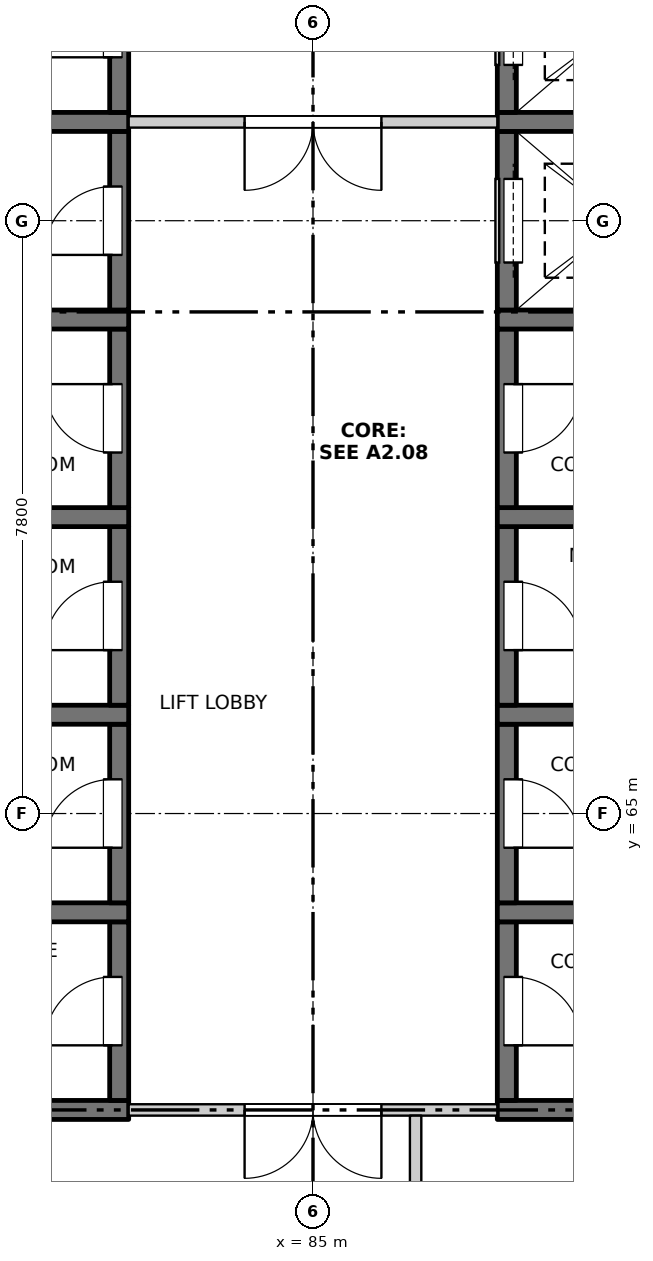
"""IFC4 building model, lengths in metres.
Left out: names, types, materials, properties, quantities, classifications, styles, units other than length and angle.
Written with IfcOpenShell. Run it as: python <this file> out.ifc"""

import sys

from ifc_helpers import new_model, si_unit, direction, frame, frame_2d, origin, place, context, subcontext, project, spatial, rectangle, extrude, element, fill, save


model = new_model("IFC4")
c1 = context("Model", 3, precision=1e-05, world=origin(), true_north=direction((0.0, 1.0)))
c2 = subcontext(c1, "Body", "Model", "MODEL_VIEW")
j1 = project(units=[si_unit("LENGTHUNIT", "METRE"), si_unit("PLANEANGLEUNIT", "RADIAN")], contexts=[c1])
p1 = place(None, origin())
s1 = spatial("IfcSite", under=j1, at=p1, CompositionType="ELEMENT")
p2 = place(p1, origin())
s2 = spatial("IfcBuilding", under=s1, at=p2, CompositionType="ELEMENT")
p3 = place(p2, frame((0.0, 0.0, 246.0)))
s3 = spatial("IfcBuildingStorey", under=s2, at=p3, CompositionType="ELEMENT", Elevation=246.0)
p4 = place(p3, frame((79.575, 61.1, -0.3), z_axis=(0.0, 0.0, 1.0), x_axis=(1.0, 0.0, 0.0)))
e1 = element("IfcWall", 1, at=p4, inside=s3, PredefinedType="SOLIDWALL", context=c2, shape_type="SweptSolid", body=[
    extrude(rectangle(XDim=3.0, YDim=0.25, at=frame_2d((1.5, 0.0))), origin(), (0.0, 0.0, 1.0), 3.45),
])
p5 = place(p3, frame((82.45, 61.225, -0.3), z_axis=(0.0, 0.0, 1.0), x_axis=(0.0, 1.0, 0.0)))
e2 = element("IfcWall", 2, at=p5, inside=s3, PredefinedType="SOLIDWALL", context=c2, shape_type="SweptSolid", body=[
    extrude(rectangle(XDim=2.35, YDim=0.25, at=frame_2d((1.175, 0.0))), origin(), (0.0, 0.0, 1.0), 3.45),
])
p6 = place(p5, frame((0.725, 0.0, 0.3)))
e3 = element("IfcOpeningElement", 3, at=p6, cuts=e2, PredefinedType="OPENING", context=c2, shape_type="SweptSolid", body=[
    extrude(rectangle(XDim=0.9, YDim=2.1, at=frame_2d((0.45, 1.05))), frame((0.0, 0.135, 0.0), z_axis=(0.0, -1.0, 0.0), x_axis=(1.0, 0.0, 0.0)), (0.0, 0.0, 1.0), 0.27),
])
p7 = place(p3, frame((79.575, 63.7, -0.3), z_axis=(0.0, 0.0, 1.0), x_axis=(1.0, 0.0, 0.0)))
e4 = element("IfcWall", 4, at=p7, inside=s3, PredefinedType="SOLIDWALL", context=c2, shape_type="SweptSolid", body=[
    extrude(rectangle(XDim=3.0, YDim=0.25, at=frame_2d((1.5, 0.0))), origin(), (0.0, 0.0, 1.0), 3.45),
])
p8 = place(p3, frame((82.45, 63.825, -0.3), z_axis=(0.0, 0.0, 1.0), x_axis=(0.0, 1.0, 0.0)))
e5 = element("IfcWall", 5, at=p8, inside=s3, PredefinedType="SOLIDWALL", context=c2, shape_type="SweptSolid", body=[
    extrude(rectangle(XDim=2.35, YDim=0.25, at=frame_2d((1.175, 0.0))), origin(), (0.0, 0.0, 1.0), 3.45),
])
p9 = place(p8, frame((0.725, 0.0, 0.3)))
e6 = element("IfcOpeningElement", 6, at=p9, cuts=e5, PredefinedType="OPENING", context=c2, shape_type="SweptSolid", body=[
    extrude(rectangle(XDim=0.9, YDim=2.1, at=frame_2d((0.45, 1.05))), frame((0.0, 0.135, 0.0), z_axis=(0.0, -1.0, 0.0), x_axis=(1.0, 0.0, 0.0)), (0.0, 0.0, 1.0), 0.27),
])
p10 = place(p3, frame((79.575, 66.3, -0.3), z_axis=(0.0, 0.0, 1.0), x_axis=(1.0, 0.0, 0.0)))
e7 = element("IfcWall", 7, at=p10, inside=s3, PredefinedType="SOLIDWALL", context=c2, shape_type="SweptSolid", body=[
    extrude(rectangle(XDim=3.0, YDim=0.25, at=frame_2d((1.5, 0.0))), origin(), (0.0, 0.0, 1.0), 3.45),
])
p11 = place(p3, frame((82.45, 66.425, -0.3), z_axis=(0.0, 0.0, 1.0), x_axis=(0.0, 1.0, 0.0)))
e8 = element("IfcWall", 8, at=p11, inside=s3, PredefinedType="SOLIDWALL", context=c2, shape_type="SweptSolid", body=[
    extrude(rectangle(XDim=2.35, YDim=0.25, at=frame_2d((1.175, 0.0))), origin(), (0.0, 0.0, 1.0), 3.45),
])
p12 = place(p11, frame((0.725, 0.0, 0.3)))
e9 = element("IfcOpeningElement", 9, at=p12, cuts=e8, PredefinedType="OPENING", context=c2, shape_type="SweptSolid", body=[
    extrude(rectangle(XDim=0.9, YDim=2.1, at=frame_2d((0.45, 1.05))), frame((0.0, 0.135, 0.0), z_axis=(0.0, -1.0, 0.0), x_axis=(1.0, 0.0, 0.0)), (0.0, 0.0, 1.0), 0.27),
])
p13 = place(p3, frame((79.575, 68.9, -0.3), z_axis=(0.0, 0.0, 1.0), x_axis=(1.0, 0.0, 0.0)))
e10 = element("IfcWall", 10, at=p13, inside=s3, PredefinedType="SOLIDWALL", context=c2, shape_type="SweptSolid", body=[
    extrude(rectangle(XDim=3.0, YDim=0.25, at=frame_2d((1.5, 0.0))), origin(), (0.0, 0.0, 1.0), 3.45),
])
p14 = place(p3, frame((82.45, 69.025, -0.3), z_axis=(0.0, 0.0, 1.0), x_axis=(0.0, 1.0, 0.0)))
e11 = element("IfcWall", 11, at=p14, inside=s3, PredefinedType="SOLIDWALL", context=c2, shape_type="SweptSolid", body=[
    extrude(rectangle(XDim=2.35, YDim=0.25, at=frame_2d((1.175, 0.0))), origin(), (0.0, 0.0, 1.0), 3.45),
])
p15 = place(p14, frame((0.725, 0.0, 0.3)))
e12 = element("IfcOpeningElement", 12, at=p15, cuts=e11, PredefinedType="OPENING", context=c2, shape_type="SweptSolid", body=[
    extrude(rectangle(XDim=0.9, YDim=2.1, at=frame_2d((0.45, 1.05))), frame((0.0, 0.135, 0.0), z_axis=(0.0, -1.0, 0.0), x_axis=(1.0, 0.0, 0.0)), (0.0, 0.0, 1.0), 0.27),
])
p16 = place(p3, frame((79.575, 71.5, -0.3), z_axis=(0.0, 0.0, 1.0), x_axis=(1.0, 0.0, 0.0)))
e13 = element("IfcWall", 13, at=p16, inside=s3, PredefinedType="SOLIDWALL", context=c2, shape_type="SweptSolid", body=[
    extrude(rectangle(XDim=3.0, YDim=0.25, at=frame_2d((1.5, 0.0))), origin(), (0.0, 0.0, 1.0), 3.45),
])
p17 = place(p3, frame((82.45, 71.625, -0.3), z_axis=(0.0, 0.0, 1.0), x_axis=(0.0, 1.0, 0.0)))
e14 = element("IfcWall", 14, at=p17, inside=s3, PredefinedType="SOLIDWALL", context=c2, shape_type="SweptSolid", body=[
    extrude(rectangle(XDim=2.35, YDim=0.25, at=frame_2d((1.175, 0.0))), origin(), (0.0, 0.0, 1.0), 3.45),
])
p18 = place(p17, frame((0.725, 0.0, 0.3)))
e15 = element("IfcOpeningElement", 15, at=p18, cuts=e14, PredefinedType="OPENING", context=c2, shape_type="SweptSolid", body=[
    extrude(rectangle(XDim=0.9, YDim=2.1, at=frame_2d((0.45, 1.05))), frame((0.0, 0.135, 0.0), z_axis=(0.0, -1.0, 0.0), x_axis=(1.0, 0.0, 0.0)), (0.0, 0.0, 1.0), 0.27),
])
p19 = place(p3, frame((79.575, 74.1, -0.3), z_axis=(0.0, 0.0, 1.0), x_axis=(1.0, 0.0, 0.0)))
e16 = element("IfcWall", 16, at=p19, inside=s3, PredefinedType="SOLIDWALL", context=c2, shape_type="SweptSolid", body=[
    extrude(rectangle(XDim=3.0, YDim=0.25, at=frame_2d((1.5, 0.0))), origin(), (0.0, 0.0, 1.0), 3.45),
])
p20 = place(p3, frame((82.45, 74.225, -0.3), z_axis=(0.0, 0.0, 1.0), x_axis=(0.0, 1.0, 0.0)))
e17 = element("IfcWall", 17, at=p20, inside=s3, PredefinedType="SOLIDWALL", context=c2, shape_type="SweptSolid", body=[
    extrude(rectangle(XDim=2.35, YDim=0.25, at=frame_2d((1.175, 0.0))), origin(), (0.0, 0.0, 1.0), 3.45),
])
p21 = place(p20, frame((0.725, 0.0, 0.3)))
e18 = element("IfcOpeningElement", 18, at=p21, cuts=e17, PredefinedType="OPENING", context=c2, shape_type="SweptSolid", body=[
    extrude(rectangle(XDim=0.9, YDim=2.1, at=frame_2d((0.45, 1.05))), frame((0.0, 0.135, 0.0), z_axis=(0.0, -1.0, 0.0), x_axis=(1.0, 0.0, 0.0)), (0.0, 0.0, 1.0), 0.27),
])
p22 = place(p3, frame((87.425, 61.1, -0.3), z_axis=(0.0, 0.0, 1.0), x_axis=(1.0, 0.0, 0.0)))
e19 = element("IfcWall", 19, at=p22, inside=s3, PredefinedType="SOLIDWALL", context=c2, shape_type="SweptSolid", body=[
    extrude(rectangle(XDim=3.0, YDim=0.25, at=frame_2d((1.5, 0.0))), origin(), (0.0, 0.0, 1.0), 3.45),
])
p23 = place(p3, frame((87.55, 61.225, -0.3), z_axis=(0.0, 0.0, 1.0), x_axis=(0.0, 1.0, 0.0)))
e20 = element("IfcWall", 20, at=p23, inside=s3, PredefinedType="SOLIDWALL", context=c2, shape_type="SweptSolid", body=[
    extrude(rectangle(XDim=2.35, YDim=0.25, at=frame_2d((1.175, 0.0))), origin(), (0.0, 0.0, 1.0), 3.45),
])
p24 = place(p23, frame((0.725, 0.0, 0.3)))
e21 = element("IfcOpeningElement", 21, at=p24, cuts=e20, PredefinedType="OPENING", context=c2, shape_type="SweptSolid", body=[
    extrude(rectangle(XDim=0.9, YDim=2.1, at=frame_2d((0.45, 1.05))), frame((0.0, 0.135, 0.0), z_axis=(0.0, -1.0, 0.0), x_axis=(1.0, 0.0, 0.0)), (0.0, 0.0, 1.0), 0.27),
])
p25 = place(p3, frame((87.425, 63.7, -0.3), z_axis=(0.0, 0.0, 1.0), x_axis=(1.0, 0.0, 0.0)))
e22 = element("IfcWall", 22, at=p25, inside=s3, PredefinedType="SOLIDWALL", context=c2, shape_type="SweptSolid", body=[
    extrude(rectangle(XDim=3.0, YDim=0.25, at=frame_2d((1.5, 0.0))), origin(), (0.0, 0.0, 1.0), 3.45),
])
p26 = place(p3, frame((87.55, 63.825, -0.3), z_axis=(0.0, 0.0, 1.0), x_axis=(0.0, 1.0, 0.0)))
e23 = element("IfcWall", 23, at=p26, inside=s3, PredefinedType="SOLIDWALL", context=c2, shape_type="SweptSolid", body=[
    extrude(rectangle(XDim=2.35, YDim=0.25, at=frame_2d((1.175, 0.0))), origin(), (0.0, 0.0, 1.0), 3.45),
])
p27 = place(p26, frame((0.725, 0.0, 0.3)))
e24 = element("IfcOpeningElement", 24, at=p27, cuts=e23, PredefinedType="OPENING", context=c2, shape_type="SweptSolid", body=[
    extrude(rectangle(XDim=0.9, YDim=2.1, at=frame_2d((0.45, 1.05))), frame((0.0, 0.135, 0.0), z_axis=(0.0, -1.0, 0.0), x_axis=(1.0, 0.0, 0.0)), (0.0, 0.0, 1.0), 0.27),
])
p28 = place(p3, frame((87.425, 66.3, -0.3), z_axis=(0.0, 0.0, 1.0), x_axis=(1.0, 0.0, 0.0)))
e25 = element("IfcWall", 25, at=p28, inside=s3, PredefinedType="SOLIDWALL", context=c2, shape_type="SweptSolid", body=[
    extrude(rectangle(XDim=3.0, YDim=0.25, at=frame_2d((1.5, 0.0))), origin(), (0.0, 0.0, 1.0), 3.45),
])
p29 = place(p3, frame((87.55, 66.425, -0.3), z_axis=(0.0, 0.0, 1.0), x_axis=(0.0, 1.0, 0.0)))
e26 = element("IfcWall", 26, at=p29, inside=s3, PredefinedType="SOLIDWALL", context=c2, shape_type="SweptSolid", body=[
    extrude(rectangle(XDim=2.35, YDim=0.25, at=frame_2d((1.175, 0.0))), origin(), (0.0, 0.0, 1.0), 3.45),
])
p30 = place(p29, frame((0.725, 0.0, 0.3)))
e27 = element("IfcOpeningElement", 27, at=p30, cuts=e26, PredefinedType="OPENING", context=c2, shape_type="SweptSolid", body=[
    extrude(rectangle(XDim=0.9, YDim=2.1, at=frame_2d((0.45, 1.05))), frame((0.0, 0.135, 0.0), z_axis=(0.0, -1.0, 0.0), x_axis=(1.0, 0.0, 0.0)), (0.0, 0.0, 1.0), 0.27),
])
p31 = place(p3, frame((87.425, 68.9, -0.3), z_axis=(0.0, 0.0, 1.0), x_axis=(1.0, 0.0, 0.0)))
e28 = element("IfcWall", 28, at=p31, inside=s3, PredefinedType="SOLIDWALL", context=c2, shape_type="SweptSolid", body=[
    extrude(rectangle(XDim=3.0, YDim=0.25, at=frame_2d((1.5, 0.0))), origin(), (0.0, 0.0, 1.0), 3.45),
])
p32 = place(p3, frame((87.55, 69.025, -0.3), z_axis=(0.0, 0.0, 1.0), x_axis=(0.0, 1.0, 0.0)))
e29 = element("IfcWall", 29, at=p32, inside=s3, PredefinedType="SOLIDWALL", context=c2, shape_type="SweptSolid", body=[
    extrude(rectangle(XDim=2.35, YDim=0.25, at=frame_2d((1.175, 0.0))), origin(), (0.0, 0.0, 1.0), 3.45),
])
p33 = place(p32, frame((0.725, 0.0, 0.3)))
e30 = element("IfcOpeningElement", 30, at=p33, cuts=e29, PredefinedType="OPENING", context=c2, shape_type="SweptSolid", body=[
    extrude(rectangle(XDim=0.9, YDim=2.1, at=frame_2d((0.45, 1.05))), frame((0.0, 0.135, 0.0), z_axis=(0.0, -1.0, 0.0), x_axis=(1.0, 0.0, 0.0)), (0.0, 0.0, 1.0), 0.27),
])
p34 = place(p3, frame((87.425, 71.5, -0.3), z_axis=(0.0, 0.0, 1.0), x_axis=(1.0, 0.0, 0.0)))
e31 = element("IfcWall", 31, at=p34, inside=s3, PredefinedType="SOLIDWALL", context=c2, shape_type="SweptSolid", body=[
    extrude(rectangle(XDim=3.0, YDim=0.25, at=frame_2d((1.5, 0.0))), origin(), (0.0, 0.0, 1.0), 3.45),
])
p35 = place(p3, frame((87.55, 71.625, -0.3), z_axis=(0.0, 0.0, 1.0), x_axis=(0.0, 1.0, 0.0)))
e32 = element("IfcWall", 32, at=p35, inside=s3, PredefinedType="SOLIDWALL", context=c2, shape_type="SweptSolid", body=[
    extrude(rectangle(XDim=2.35, YDim=0.25, at=frame_2d((1.175, 0.0))), origin(), (0.0, 0.0, 1.0), 3.45),
])
p36 = place(p35, frame((0.625, 0.0, 0.3)))
e33 = element("IfcOpeningElement", 33, at=p36, cuts=e32, PredefinedType="OPENING", context=c2, shape_type="SweptSolid", body=[
    extrude(rectangle(XDim=1.1, YDim=2.1, at=frame_2d((0.55, 1.05))), frame((0.0, 0.135, 0.0), z_axis=(0.0, -1.0, 0.0), x_axis=(1.0, 0.0, 0.0)), (0.0, 0.0, 1.0), 0.27),
])
p37 = place(p3, frame((87.425, 74.1, -0.3), z_axis=(0.0, 0.0, 1.0), x_axis=(1.0, 0.0, 0.0)))
e34 = element("IfcWall", 34, at=p37, inside=s3, PredefinedType="SOLIDWALL", context=c2, shape_type="SweptSolid", body=[
    extrude(rectangle(XDim=3.0, YDim=0.25, at=frame_2d((1.5, 0.0))), origin(), (0.0, 0.0, 1.0), 3.45),
])
p38 = place(p3, frame((87.55, 74.225, -0.3), z_axis=(0.0, 0.0, 1.0), x_axis=(0.0, 1.0, 0.0)))
e35 = element("IfcWall", 35, at=p38, inside=s3, PredefinedType="SOLIDWALL", context=c2, shape_type="SweptSolid", body=[
    extrude(rectangle(XDim=2.35, YDim=0.25, at=frame_2d((1.175, 0.0))), origin(), (0.0, 0.0, 1.0), 3.45),
])
p39 = place(p38, frame((0.625, 0.0, 0.3)))
e36 = element("IfcOpeningElement", 36, at=p39, cuts=e35, PredefinedType="OPENING", context=c2, shape_type="SweptSolid", body=[
    extrude(rectangle(XDim=1.1, YDim=2.1, at=frame_2d((0.55, 1.05))), frame((0.0, 0.135, 0.0), z_axis=(0.0, -1.0, 0.0), x_axis=(1.0, 0.0, 0.0)), (0.0, 0.0, 1.0), 0.27),
])
p40 = place(p3, frame((82.575, 61.1, 0.0), z_axis=(0.0, 0.0, 1.0), x_axis=(1.0, 0.0, 0.0)))
e37 = element("IfcWall", 37, at=p40, inside=s3, PredefinedType="PARTITIONING", context=c2, shape_type="SweptSolid", body=[
    extrude(rectangle(XDim=4.85, YDim=0.15, at=frame_2d((2.425, 0.0))), origin(), (0.0, 0.0, 1.0), 3.15),
])
p41 = place(p40, frame((1.525, 0.0, 0.0)))
e38 = element("IfcOpeningElement", 38, at=p41, cuts=e37, PredefinedType="OPENING", context=c2, shape_type="SweptSolid", body=[
    extrude(rectangle(XDim=1.8, YDim=2.1, at=frame_2d((0.9, 1.05))), frame((0.0, 0.085, 0.0), z_axis=(0.0, -1.0, 0.0), x_axis=(1.0, 0.0, 0.0)), (0.0, 0.0, 1.0), 0.17),
])
p42 = place(p3, frame((82.575, 74.1, 0.0), z_axis=(0.0, 0.0, 1.0), x_axis=(1.0, 0.0, 0.0)))
e39 = element("IfcWall", 39, at=p42, inside=s3, PredefinedType="PARTITIONING", context=c2, shape_type="SweptSolid", body=[
    extrude(rectangle(XDim=4.85, YDim=0.15, at=frame_2d((2.425, 0.0))), origin(), (0.0, 0.0, 1.0), 3.15),
])
p43 = place(p42, frame((1.525, 0.0, 0.0)))
e40 = element("IfcOpeningElement", 40, at=p43, cuts=e39, PredefinedType="OPENING", context=c2, shape_type="SweptSolid", body=[
    extrude(rectangle(XDim=1.8, YDim=2.1, at=frame_2d((0.9, 1.05))), frame((0.0, 0.085, 0.0), z_axis=(0.0, -1.0, 0.0), x_axis=(1.0, 0.0, 0.0)), (0.0, 0.0, 1.0), 0.17),
])
p44 = place(p3, frame((86.35, 55.45, 0.0), z_axis=(0.0, 0.0, 1.0), x_axis=(0.0, 1.0, 0.0)))
e41 = element("IfcWall", 41, at=p44, inside=s3, PredefinedType="PARTITIONING", context=c2, shape_type="SweptSolid", body=[
    extrude(rectangle(XDim=5.575, YDim=0.15, at=frame_2d((2.788, 0.0))), origin(), (0.0, 0.0, 1.0), 3.15),
])
p45 = place(p44, frame((2.25, 0.0, 0.0)))
e42 = element("IfcOpeningElement", 42, at=p45, cuts=e41, PredefinedType="OPENING", context=c2, shape_type="SweptSolid", body=[
    extrude(rectangle(XDim=0.9, YDim=2.1, at=frame_2d((0.45, 1.05))), frame((0.0, 0.085, 0.0), z_axis=(0.0, -1.0, 0.0), x_axis=(1.0, 0.0, 0.0)), (0.0, 0.0, 1.0), 0.17),
])
p46 = place(p41, origin())
e43 = element("IfcDoor", 43, at=p46, inside=s3, OperationType="DOUBLE_DOOR_SINGLE_SWING", PredefinedType="DOOR", context=c2, shape_type="SweptSolid", body=[
    extrude(rectangle(XDim=1.8, YDim=2.1, at=frame_2d((0.9, 1.05))), frame((0.0, 0.025, 0.0), z_axis=(0.0, -1.0, 0.0), x_axis=(1.0, 0.0, 0.0)), (0.0, 0.0, 1.0), 0.05),
])
fill(e38, e43)
p47 = place(p6, origin())
e44 = element("IfcDoor", 44, at=p47, inside=s3, OperationType="SINGLE_SWING_LEFT", PredefinedType="DOOR", context=c2, shape_type="SweptSolid", body=[
    extrude(rectangle(XDim=0.9, YDim=2.1, at=frame_2d((0.45, 1.05))), frame((0.0, 0.11, 0.0), z_axis=(0.0, -1.0, 0.0), x_axis=(1.0, 0.0, 0.0)), (0.0, 0.0, 1.0), 0.05),
])
fill(e3, e44)
p48 = place(p24, origin())
e45 = element("IfcDoor", 45, at=p48, inside=s3, OperationType="SINGLE_SWING_RIGHT", PredefinedType="DOOR", context=c2, shape_type="SweptSolid", body=[
    extrude(rectangle(XDim=0.9, YDim=2.1, at=frame_2d((0.45, 1.05))), frame((0.0, -0.06, 0.0), z_axis=(0.0, -1.0, 0.0), x_axis=(1.0, 0.0, 0.0)), (0.0, 0.0, 1.0), 0.05),
])
fill(e21, e45)
p49 = place(p9, origin())
e46 = element("IfcDoor", 46, at=p49, inside=s3, OperationType="SINGLE_SWING_LEFT", PredefinedType="DOOR", context=c2, shape_type="SweptSolid", body=[
    extrude(rectangle(XDim=0.9, YDim=2.1, at=frame_2d((0.45, 1.05))), frame((0.0, 0.11, 0.0), z_axis=(0.0, -1.0, 0.0), x_axis=(1.0, 0.0, 0.0)), (0.0, 0.0, 1.0), 0.05),
])
fill(e6, e46)
p50 = place(p27, origin())
e47 = element("IfcDoor", 47, at=p50, inside=s3, OperationType="SINGLE_SWING_RIGHT", PredefinedType="DOOR", context=c2, shape_type="SweptSolid", body=[
    extrude(rectangle(XDim=0.9, YDim=2.1, at=frame_2d((0.45, 1.05))), frame((0.0, -0.06, 0.0), z_axis=(0.0, -1.0, 0.0), x_axis=(1.0, 0.0, 0.0)), (0.0, 0.0, 1.0), 0.05),
])
fill(e24, e47)
p51 = place(p12, origin())
e48 = element("IfcDoor", 48, at=p51, inside=s3, OperationType="SINGLE_SWING_LEFT", PredefinedType="DOOR", context=c2, shape_type="SweptSolid", body=[
    extrude(rectangle(XDim=0.9, YDim=2.1, at=frame_2d((0.45, 1.05))), frame((0.0, 0.11, 0.0), z_axis=(0.0, -1.0, 0.0), x_axis=(1.0, 0.0, 0.0)), (0.0, 0.0, 1.0), 0.05),
])
fill(e9, e48)
p52 = place(p30, origin())
e49 = element("IfcDoor", 49, at=p52, inside=s3, OperationType="SINGLE_SWING_RIGHT", PredefinedType="DOOR", context=c2, shape_type="SweptSolid", body=[
    extrude(rectangle(XDim=0.9, YDim=2.1, at=frame_2d((0.45, 1.05))), frame((0.0, -0.06, 0.0), z_axis=(0.0, -1.0, 0.0), x_axis=(1.0, 0.0, 0.0)), (0.0, 0.0, 1.0), 0.05),
])
fill(e27, e49)
p53 = place(p15, origin())
e50 = element("IfcDoor", 50, at=p53, inside=s3, OperationType="SINGLE_SWING_RIGHT", PredefinedType="DOOR", context=c2, shape_type="SweptSolid", body=[
    extrude(rectangle(XDim=0.9, YDim=2.1, at=frame_2d((0.45, 1.05))), frame((0.0, 0.11, 0.0), z_axis=(0.0, -1.0, 0.0), x_axis=(1.0, 0.0, 0.0)), (0.0, 0.0, 1.0), 0.05),
])
fill(e12, e50)
p54 = place(p33, origin())
e51 = element("IfcDoor", 51, at=p54, inside=s3, OperationType="SINGLE_SWING_LEFT", PredefinedType="DOOR", context=c2, shape_type="SweptSolid", body=[
    extrude(rectangle(XDim=0.9, YDim=2.1, at=frame_2d((0.45, 1.05))), frame((0.0, -0.06, 0.0), z_axis=(0.0, -1.0, 0.0), x_axis=(1.0, 0.0, 0.0)), (0.0, 0.0, 1.0), 0.05),
])
fill(e30, e51)
p55 = place(p18, origin())
e52 = element("IfcDoor", 52, at=p55, inside=s3, OperationType="SINGLE_SWING_LEFT", PredefinedType="DOOR", context=c2, shape_type="SweptSolid", body=[
    extrude(rectangle(XDim=0.9, YDim=2.1, at=frame_2d((0.45, 1.05))), frame((0.0, 0.11, 0.0), z_axis=(0.0, -1.0, 0.0), x_axis=(1.0, 0.0, 0.0)), (0.0, 0.0, 1.0), 0.05),
])
fill(e15, e52)
p56 = place(p36, origin())
e53 = element("IfcDoor", 53, at=p56, inside=s3, OperationType="SLIDING_TO_LEFT", PredefinedType="DOOR", context=c2, shape_type="SweptSolid", body=[
    extrude(rectangle(XDim=1.1, YDim=2.1, at=frame_2d((0.55, 1.05))), frame((0.0, -0.06, 0.0), z_axis=(0.0, -1.0, 0.0), x_axis=(1.0, 0.0, 0.0)), (0.0, 0.0, 1.0), 0.05),
])
fill(e33, e53)
p57 = place(p43, origin())
e54 = element("IfcDoor", 54, at=p57, inside=s3, OperationType="DOUBLE_DOOR_SINGLE_SWING", PredefinedType="DOOR", context=c2, shape_type="SweptSolid", body=[
    extrude(rectangle(XDim=1.8, YDim=2.1, at=frame_2d((0.9, 1.05))), frame((0.0, 0.025, 0.0), z_axis=(0.0, -1.0, 0.0), x_axis=(1.0, 0.0, 0.0)), (0.0, 0.0, 1.0), 0.05),
])
fill(e40, e54)
p58 = place(p21, origin())
e55 = element("IfcDoor", 55, at=p58, inside=s3, OperationType="SINGLE_SWING_LEFT", PredefinedType="DOOR", context=c2, shape_type="SweptSolid", body=[
    extrude(rectangle(XDim=0.9, YDim=2.1, at=frame_2d((0.45, 1.05))), frame((0.0, 0.11, 0.0), z_axis=(0.0, -1.0, 0.0), x_axis=(1.0, 0.0, 0.0)), (0.0, 0.0, 1.0), 0.05),
])
fill(e18, e55)
p59 = place(p39, origin())
e56 = element("IfcDoor", 56, at=p59, inside=s3, OperationType="SLIDING_TO_LEFT", PredefinedType="DOOR", context=c2, shape_type="SweptSolid", body=[
    extrude(rectangle(XDim=1.1, YDim=2.1, at=frame_2d((0.55, 1.05))), frame((0.0, -0.06, 0.0), z_axis=(0.0, -1.0, 0.0), x_axis=(1.0, 0.0, 0.0)), (0.0, 0.0, 1.0), 0.05),
])
fill(e36, e56)
save(model, sys.argv[1])
